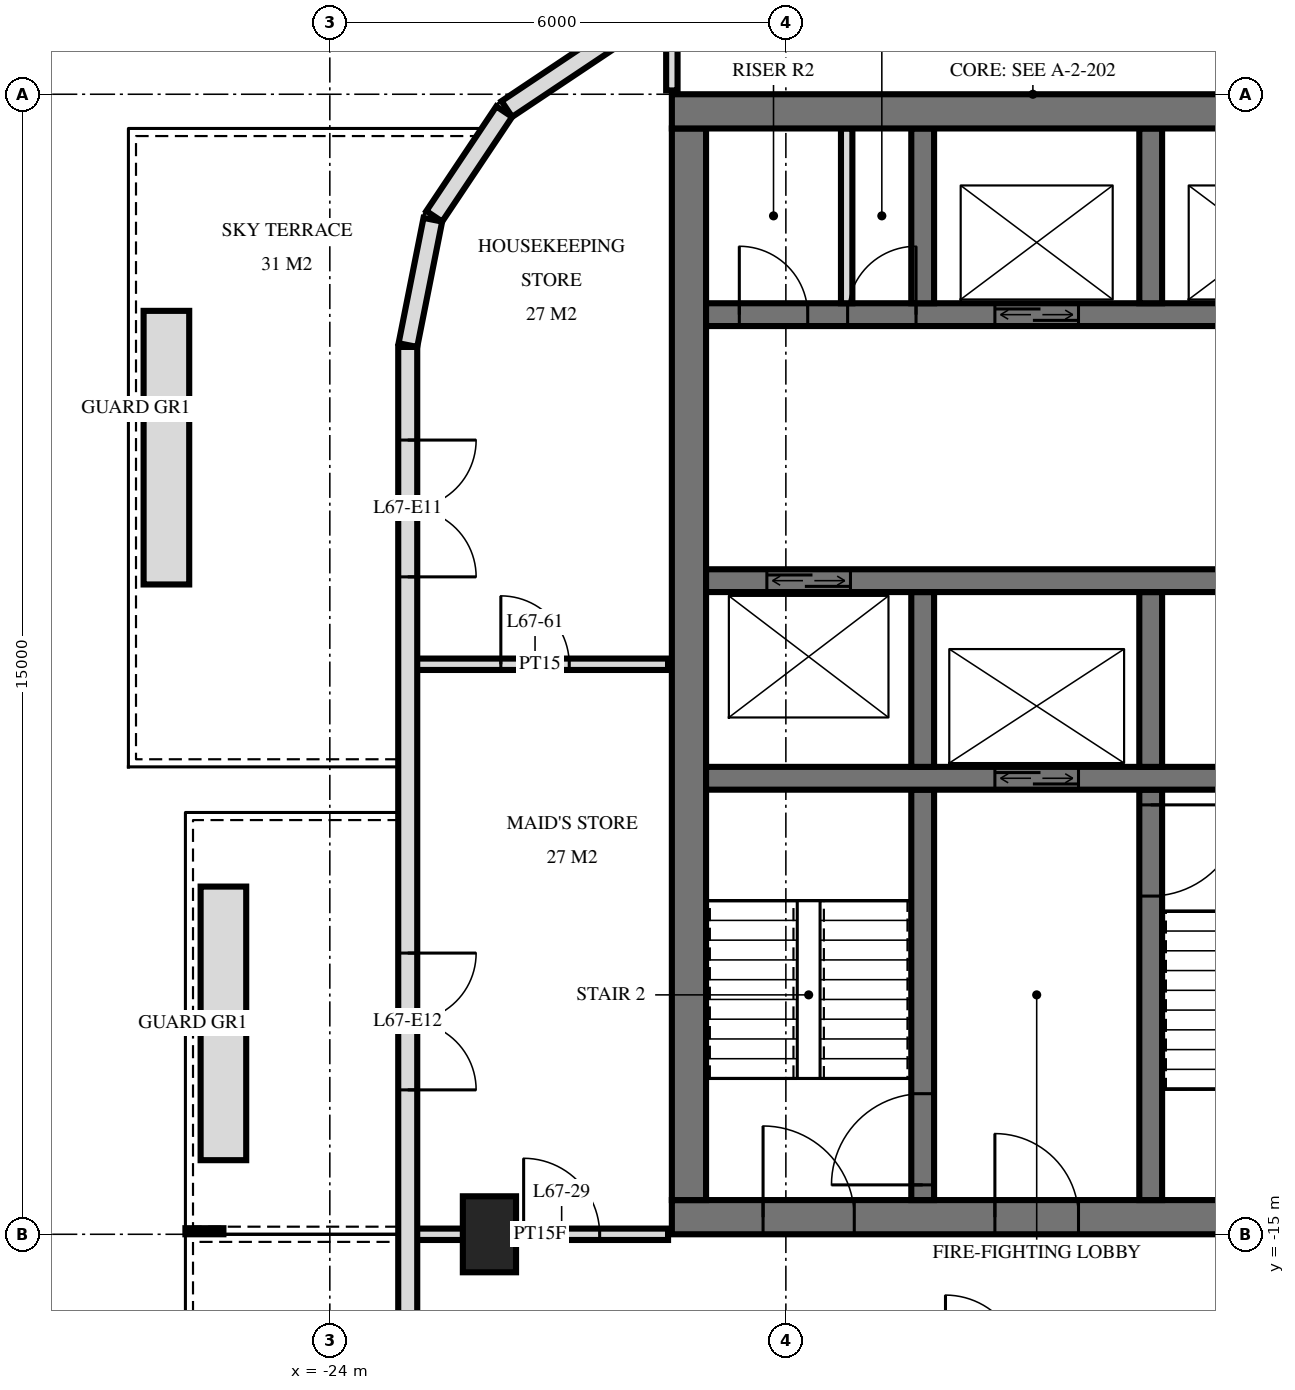
"""IFC4 building model, lengths in metres.
Left out: names, types, materials, properties, quantities, classifications, styles, units other than length and angle.
Written with IfcOpenShell. Run it as: python <this file> out.ifc"""

import sys

from ifc_helpers import new_model, si_unit, direction, frame, frame_2d, origin, origin_2d, place, context, subcontext, project, spatial, rectangle, extrude, element, fill, save


model = new_model("IFC4")
c1 = context("Model", 3, precision=1e-05, world=origin(), true_north=direction((0.0, 1.0)))
c2 = subcontext(c1, "Body", "Model", "MODEL_VIEW")
j1 = project(units=[si_unit("LENGTHUNIT", "METRE"), si_unit("PLANEANGLEUNIT", "RADIAN")], contexts=[c1])
p1 = place(None, origin())
s1 = spatial("IfcSite", under=j1, at=p1, CompositionType="ELEMENT")
p2 = place(p1, origin())
s2 = spatial("IfcBuilding", under=s1, at=p2, CompositionType="ELEMENT")
p3 = place(p2, frame((0.0, 0.0, 256.1)))
s3 = spatial("IfcBuildingStorey", under=s2, at=p3, CompositionType="ELEMENT", Elevation=256.1)
p4 = place(p3, frame((-21.9, -15.0, 0.0), z_axis=(0.0, 0.0, 1.0), x_axis=(0.0, 1.0, 0.0)))
e1 = element("IfcColumn", 1, at=p4, inside=s3, PredefinedType="COLUMN", context=c2, shape_type="SweptSolid", body=[
    extrude(rectangle(XDim=1.0, YDim=0.7, at=origin_2d()), origin(), (0.0, 0.0, 1.0), 3.5),
])
p5 = place(p3, frame((-19.5, -0.225, 0.0), z_axis=(0.0, 0.0, 1.0), x_axis=(1.0, 0.0, 0.0)))
e2 = element("IfcWall", 2, at=p5, inside=s3, PredefinedType="SHEAR", context=c2, shape_type="SweptSolid", body=[
    extrude(rectangle(XDim=9.5, YDim=0.45, at=frame_2d((4.75, 0.0))), origin(), (0.0, 0.0, 1.0), 3.5),
])
p6 = place(p3, frame((-19.5, -14.775, 0.0), z_axis=(0.0, 0.0, 1.0), x_axis=(1.0, 0.0, 0.0)))
e3 = element("IfcWall", 3, at=p6, inside=s3, PredefinedType="SHEAR", context=c2, shape_type="SweptSolid", body=[
    extrude(rectangle(XDim=9.5, YDim=0.45, at=frame_2d((4.75, 0.0))), origin(), (0.0, 0.0, 1.0), 3.5),
])
p7 = place(p6, frame((1.2, 0.0, 0.0)))
e4 = element("IfcOpeningElement", 4, at=p7, cuts=e3, PredefinedType="OPENING", context=c2, shape_type="SweptSolid", body=[
    extrude(rectangle(XDim=1.2, YDim=2.1, at=frame_2d((0.6, 1.05))), frame((0.0, 0.235, 0.0), z_axis=(0.0, -1.0, 0.0), x_axis=(1.0, 0.0, 0.0)), (0.0, 0.0, 1.0), 0.47),
])
p8 = place(p6, frame((4.25, 0.0, 0.0)))
e5 = element("IfcOpeningElement", 5, at=p8, cuts=e3, PredefinedType="OPENING", context=c2, shape_type="SweptSolid", body=[
    extrude(rectangle(XDim=1.1, YDim=2.1, at=frame_2d((0.55, 1.05))), frame((0.0, 0.235, 0.0), z_axis=(0.0, -1.0, 0.0), x_axis=(1.0, 0.0, 0.0)), (0.0, 0.0, 1.0), 0.47),
])
p9 = place(p3, frame((-19.275, -14.55, 0.0), z_axis=(0.0, 0.0, 1.0), x_axis=(0.0, 1.0, 0.0)))
e6 = element("IfcWall", 6, at=p9, inside=s3, PredefinedType="SHEAR", context=c2, shape_type="SweptSolid", body=[
    extrude(rectangle(XDim=14.1, YDim=0.45, at=frame_2d((7.05, 0.0))), origin(), (0.0, 0.0, 1.0), 3.5),
])
p10 = place(p3, frame((-19.05, -2.9, 0.0), z_axis=(0.0, 0.0, 1.0), x_axis=(1.0, 0.0, 0.0)))
e7 = element("IfcWall", 7, at=p10, inside=s3, PredefinedType="SHEAR", context=c2, shape_type="SweptSolid", body=[
    extrude(rectangle(XDim=8.7, YDim=0.3, at=frame_2d((4.35, 0.0))), origin(), (0.0, 0.0, 1.0), 3.5),
])
p11 = place(p10, frame((6.8, 0.0, 0.0)))
e8 = element("IfcOpeningElement", 8, at=p11, cuts=e7, PredefinedType="OPENING", context=c2, shape_type="SweptSolid", body=[
    extrude(rectangle(XDim=1.1, YDim=2.1, at=frame_2d((0.55, 1.05))), frame((0.0, 0.16, 0.0), z_axis=(0.0, -1.0, 0.0), x_axis=(1.0, 0.0, 0.0)), (0.0, 0.0, 1.0), 0.32),
])
p12 = place(p10, frame((3.8, 0.0, 0.0)))
e9 = element("IfcOpeningElement", 9, at=p12, cuts=e7, PredefinedType="OPENING", context=c2, shape_type="SweptSolid", body=[
    extrude(rectangle(XDim=1.1, YDim=2.1, at=frame_2d((0.55, 1.05))), frame((0.0, 0.16, 0.0), z_axis=(0.0, -1.0, 0.0), x_axis=(1.0, 0.0, 0.0)), (0.0, 0.0, 1.0), 0.32),
])
p13 = place(p10, frame((1.863, 0.0, 0.0)))
e10 = element("IfcOpeningElement", 10, at=p13, cuts=e7, PredefinedType="OPENING", context=c2, shape_type="SweptSolid", body=[
    extrude(rectangle(XDim=0.9, YDim=2.1, at=frame_2d((0.45, 1.05))), frame((0.0, 0.16, 0.0), z_axis=(0.0, -1.0, 0.0), x_axis=(1.0, 0.0, 0.0)), (0.0, 0.0, 1.0), 0.32),
])
p14 = place(p10, frame((0.438, 0.0, 0.0)))
e11 = element("IfcOpeningElement", 11, at=p14, cuts=e7, PredefinedType="OPENING", context=c2, shape_type="SweptSolid", body=[
    extrude(rectangle(XDim=0.9, YDim=2.1, at=frame_2d((0.45, 1.05))), frame((0.0, 0.16, 0.0), z_axis=(0.0, -1.0, 0.0), x_axis=(1.0, 0.0, 0.0)), (0.0, 0.0, 1.0), 0.32),
])
p15 = place(p3, frame((-19.05, -6.4, 0.0), z_axis=(0.0, 0.0, 1.0), x_axis=(1.0, 0.0, 0.0)))
e12 = element("IfcWall", 12, at=p15, inside=s3, PredefinedType="SHEAR", context=c2, shape_type="SweptSolid", body=[
    extrude(rectangle(XDim=8.7, YDim=0.3, at=frame_2d((4.35, 0.0))), origin(), (0.0, 0.0, 1.0), 3.5),
])
p16 = place(p15, frame((0.8, 0.0, 0.0)))
e13 = element("IfcOpeningElement", 13, at=p16, cuts=e12, PredefinedType="OPENING", context=c2, shape_type="SweptSolid", body=[
    extrude(rectangle(XDim=1.1, YDim=2.1, at=frame_2d((0.55, 1.05))), frame((0.0, 0.16, 0.0), z_axis=(0.0, -1.0, 0.0), x_axis=(1.0, 0.0, 0.0)), (0.0, 0.0, 1.0), 0.32),
])
p17 = place(p3, frame((-19.05, -9.0, 0.0), z_axis=(0.0, 0.0, 1.0), x_axis=(1.0, 0.0, 0.0)))
e14 = element("IfcWall", 14, at=p17, inside=s3, PredefinedType="SHEAR", context=c2, shape_type="SweptSolid", body=[
    extrude(rectangle(XDim=8.7, YDim=0.3, at=frame_2d((4.35, 0.0))), origin(), (0.0, 0.0, 1.0), 3.5),
])
p18 = place(p17, frame((3.8, 0.0, 0.0)))
e15 = element("IfcOpeningElement", 15, at=p18, cuts=e14, PredefinedType="OPENING", context=c2, shape_type="SweptSolid", body=[
    extrude(rectangle(XDim=1.1, YDim=2.1, at=frame_2d((0.55, 1.05))), frame((0.0, 0.16, 0.0), z_axis=(0.0, -1.0, 0.0), x_axis=(1.0, 0.0, 0.0)), (0.0, 0.0, 1.0), 0.32),
])
for number, where, z_axis, x_axis in (
    (16, (-13.2, -2.75, 0.0), (0.0, 0.0, 1.0), (0.0, 1.0, 0.0)),
    (17, (-13.2, -8.85, 0.0), (0.0, 0.0, 1.0), (0.0, 1.0, 0.0)),
):
    element("IfcWall", number, at=place(p3, frame(where, z_axis=z_axis, x_axis=x_axis)), inside=s3, PredefinedType="SHEAR", context=c2, shape_type="SweptSolid", body=[
        extrude(rectangle(XDim=2.3, YDim=0.3, at=frame_2d((1.15, 0.0))), origin(), (0.0, 0.0, 1.0), 3.5),
    ])
p19 = place(p3, frame((-13.2, -14.55, 0.0), z_axis=(0.0, 0.0, 1.0), x_axis=(0.0, 1.0, 0.0)))
e18 = element("IfcWall", 18, at=p19, inside=s3, PredefinedType="SHEAR", context=c2, shape_type="SweptSolid", body=[
    extrude(rectangle(XDim=5.4, YDim=0.3, at=frame_2d((2.7, 0.0))), origin(), (0.0, 0.0, 1.0), 3.5),
])
p20 = place(p19, frame((4.0, 0.0, 0.0)))
e19 = element("IfcOpeningElement", 19, at=p20, cuts=e18, PredefinedType="OPENING", context=c2, shape_type="SweptSolid", body=[
    extrude(rectangle(XDim=1.2, YDim=2.1, at=frame_2d((0.6, 1.05))), frame((0.0, 0.16, 0.0), z_axis=(0.0, -1.0, 0.0), x_axis=(1.0, 0.0, 0.0)), (0.0, 0.0, 1.0), 0.32),
])
for number, where, z_axis, x_axis in (
    (20, (-16.2, -2.75, 0.0), (0.0, 0.0, 1.0), (0.0, 1.0, 0.0)),
    (21, (-16.2, -8.85, 0.0), (0.0, 0.0, 1.0), (0.0, 1.0, 0.0)),
):
    element("IfcWall", number, at=place(p3, frame(where, z_axis=z_axis, x_axis=x_axis)), inside=s3, PredefinedType="SHEAR", context=c2, shape_type="SweptSolid", body=[
        extrude(rectangle(XDim=2.3, YDim=0.3, at=frame_2d((1.15, 0.0))), origin(), (0.0, 0.0, 1.0), 3.5),
    ])
p21 = place(p3, frame((-16.2, -14.55, 0.0), z_axis=(0.0, 0.0, 1.0), x_axis=(0.0, 1.0, 0.0)))
e22 = element("IfcWall", 22, at=p21, inside=s3, PredefinedType="SHEAR", context=c2, shape_type="SweptSolid", body=[
    extrude(rectangle(XDim=5.4, YDim=0.3, at=frame_2d((2.7, 0.0))), origin(), (0.0, 0.0, 1.0), 3.5),
])
p22 = place(p21, frame((0.2, 0.0, 0.0)))
e23 = element("IfcOpeningElement", 23, at=p22, cuts=e22, PredefinedType="OPENING", context=c2, shape_type="SweptSolid", body=[
    extrude(rectangle(XDim=1.2, YDim=2.1, at=frame_2d((0.6, 1.05))), frame((0.0, 0.16, 0.0), z_axis=(0.0, -1.0, 0.0), x_axis=(1.0, 0.0, 0.0)), (0.0, 0.0, 1.0), 0.32),
])
for number, where, z_axis, x_axis in (
    (24, (-20.294, 0.726, 0.0), (0.0, 0.0, 1.0), (-0.831, -0.556, 0.0)),
    (25, (-21.706, -0.229, 0.0), (0.0, 0.0, 1.0), (-0.556, -0.831, 0.0)),
):
    element("IfcWall", number, at=place(p3, frame(where, z_axis=z_axis, x_axis=x_axis)), inside=s3, PredefinedType="SOLIDWALL", context=c2, shape_type="SweptSolid", body=[
        extrude(rectangle(XDim=1.656, YDim=0.25, at=frame_2d((0.828, 0.0))), origin(), (0.0, 0.0, 1.0), 3.22),
    ])
p23 = place(p3, frame((-22.645, -1.651, 0.0), z_axis=(0.0, 0.0, 1.0), x_axis=(-0.19513878023, -0.980775640221, 0.0)))
e26 = element("IfcWall", 26, at=p23, inside=s3, PredefinedType="SOLIDWALL", context=c2, shape_type="SweptSolid", body=[
    extrude(rectangle(XDim=1.681, YDim=0.25, at=frame_2d((0.841, 0.0))), origin(), (0.0, 0.0, 1.0), 3.22),
])
p24 = place(p3, frame((-22.975, -3.325, 0.0), z_axis=(0.0, 0.0, 1.0), x_axis=(0.0, -1.0, 0.0)))
e27 = element("IfcWall", 27, at=p24, inside=s3, PredefinedType="SOLIDWALL", context=c2, shape_type="SweptSolid", body=[
    extrude(rectangle(XDim=25.951, YDim=0.25, at=frame_2d((12.975, 0.0))), origin(), (0.0, 0.0, 1.0), 3.22),
])
p25 = place(p24, frame((1.225, 0.0, 0.0)))
e28 = element("IfcOpeningElement", 28, at=p25, cuts=e27, PredefinedType="OPENING", context=c2, shape_type="SweptSolid", body=[
    extrude(rectangle(XDim=1.8, YDim=2.4, at=frame_2d((0.9, 1.2))), frame((0.0, 0.135, 0.0), z_axis=(0.0, -1.0, 0.0), x_axis=(1.0, 0.0, 0.0)), (0.0, 0.0, 1.0), 0.27),
])
p26 = place(p24, frame((7.975, 0.0, 0.0)))
e29 = element("IfcOpeningElement", 29, at=p26, cuts=e27, PredefinedType="OPENING", context=c2, shape_type="SweptSolid", body=[
    extrude(rectangle(XDim=1.8, YDim=2.4, at=frame_2d((0.9, 1.2))), frame((0.0, 0.135, 0.0), z_axis=(0.0, -1.0, 0.0), x_axis=(1.0, 0.0, 0.0)), (0.0, 0.0, 1.0), 0.27),
])
p27 = place(p24, frame((18.175, 0.0, 0.0)))
e30 = element("IfcOpeningElement", 30, at=p27, cuts=e27, PredefinedType="OPENING", context=c2, shape_type="SweptSolid", body=[
    extrude(rectangle(XDim=1.8, YDim=2.4, at=frame_2d((0.9, 1.2))), frame((0.0, 0.135, 0.0), z_axis=(0.0, -1.0, 0.0), x_axis=(1.0, 0.0, 0.0)), (0.0, 0.0, 1.0), 0.27),
])
p28 = place(p24, frame((21.075, 0.0, 0.0)))
e31 = element("IfcOpeningElement", 31, at=p28, cuts=e27, PredefinedType="OPENING", context=c2, shape_type="SweptSolid", body=[
    extrude(rectangle(XDim=1.8, YDim=2.4, at=frame_2d((0.9, 1.2))), frame((0.0, 0.135, 0.0), z_axis=(0.0, -1.0, 0.0), x_axis=(1.0, 0.0, 0.0)), (0.0, 0.0, 1.0), 0.27),
])
p29 = place(p24, frame((23.825, 0.0, 0.9)))
e32 = element("IfcOpeningElement", 32, at=p29, cuts=e27, PredefinedType="OPENING", context=c2, shape_type="SweptSolid", body=[
    extrude(rectangle(XDim=1.8, YDim=1.5, at=frame_2d((0.9, 0.75))), frame((0.0, 0.135, 0.0), z_axis=(0.0, -1.0, 0.0), x_axis=(1.0, 0.0, 0.0)), (0.0, 0.0, 1.0), 0.27),
])
for number, where, z_axis, x_axis in (
    (33, (-25.4, -14.025, 0.0), (0.0, 0.0, 1.0), (0.0, 1.0, 0.0)),
    (34, (-26.15, -6.45, 0.0), (0.0, 0.0, 1.0), (0.0, 1.0, 0.0)),
):
    element("IfcWall", number, at=place(p3, frame(where, z_axis=z_axis, x_axis=x_axis)), inside=s3, PredefinedType="USERDEFINED", context=c2, shape_type="SweptSolid", body=[
        extrude(rectangle(XDim=3.6, YDim=0.6, at=frame_2d((1.8, 0.0))), origin(), (0.0, 0.0, 1.0), 0.65),
    ])
p30 = place(p3, frame((-17.2, -2.75, 0.0), z_axis=(0.0, 0.0, 1.0), x_axis=(0.0, 1.0, 0.0)))
e35 = element("IfcWall", 35, at=p30, inside=s3, PredefinedType="PARTITIONING", context=c2, shape_type="SweptSolid", body=[
    extrude(rectangle(XDim=2.3, YDim=0.15, at=frame_2d((1.15, 0.0))), origin(), (0.0, 0.0, 1.0), 3.2),
])
p31 = place(p3, frame((-19.5, 0.05, 0.0), z_axis=(0.0, 0.0, 1.0), x_axis=(0.0, 1.0, 0.0)))
e36 = element("IfcWall", 36, at=p31, inside=s3, PredefinedType="PARTITIONING", context=c2, shape_type="SweptSolid", body=[
    extrude(rectangle(XDim=0.787, YDim=0.15, at=frame_2d((0.394, 0.0))), origin(), (0.0, 0.0, 1.0), 3.22),
])
p32 = place(p3, frame((-22.92, -15.0, 0.0), z_axis=(0.0, 0.0, 1.0), x_axis=(1.0, 0.0, 0.0)))
e37 = element("IfcWall", 37, at=p32, inside=s3, PredefinedType="PARTITIONING", context=c2, shape_type="SweptSolid", body=[
    extrude(rectangle(XDim=3.37, YDim=0.15, at=frame_2d((1.685, 0.0))), origin(), (0.0, 0.0, 1.0), 3.22),
])
p33 = place(p32, frame((1.47, 0.0, 0.0)))
e38 = element("IfcOpeningElement", 38, at=p33, cuts=e37, PredefinedType="OPENING", context=c2, shape_type="SweptSolid", body=[
    extrude(rectangle(XDim=1.0, YDim=2.1, at=frame_2d((0.5, 1.05))), frame((0.0, 0.085, 0.0), z_axis=(0.0, -1.0, 0.0), x_axis=(1.0, 0.0, 0.0)), (0.0, 0.0, 1.0), 0.17),
])
p34 = place(p3, frame((-22.92, -7.5, 0.0), z_axis=(0.0, 0.0, 1.0), x_axis=(1.0, 0.0, 0.0)))
e39 = element("IfcWall", 39, at=p34, inside=s3, PredefinedType="PARTITIONING", context=c2, shape_type="SweptSolid", body=[
    extrude(rectangle(XDim=3.37, YDim=0.15, at=frame_2d((1.685, 0.0))), origin(), (0.0, 0.0, 1.0), 3.22),
])
p35 = place(p34, frame((1.17, 0.0, 0.0)))
e40 = element("IfcOpeningElement", 40, at=p35, cuts=e39, PredefinedType="OPENING", context=c2, shape_type="SweptSolid", body=[
    extrude(rectangle(XDim=0.9, YDim=2.1, at=frame_2d((0.45, 1.05))), frame((0.0, 0.085, 0.0), z_axis=(0.0, -1.0, 0.0), x_axis=(1.0, 0.0, 0.0)), (0.0, 0.0, 1.0), 0.17),
])
p36 = place(p25, origin())
e41 = element("IfcDoor", 41, at=p36, inside=s3, OperationType="DOUBLE_DOOR_SINGLE_SWING", PredefinedType="DOOR", context=c2, shape_type="SweptSolid", body=[
    extrude(rectangle(XDim=1.8, YDim=2.4, at=frame_2d((0.9, 1.2))), frame((0.0, 0.025, 0.0), z_axis=(0.0, -1.0, 0.0), x_axis=(1.0, 0.0, 0.0)), (0.0, 0.0, 1.0), 0.05),
])
fill(e28, e41)
p37 = place(p26, origin())
e42 = element("IfcDoor", 42, at=p37, inside=s3, OperationType="DOUBLE_DOOR_SINGLE_SWING", PredefinedType="DOOR", context=c2, shape_type="SweptSolid", body=[
    extrude(rectangle(XDim=1.8, YDim=2.4, at=frame_2d((0.9, 1.2))), frame((0.0, 0.025, 0.0), z_axis=(0.0, -1.0, 0.0), x_axis=(1.0, 0.0, 0.0)), (0.0, 0.0, 1.0), 0.05),
])
fill(e29, e42)
p38 = place(p12, origin())
e43 = element("IfcDoor", 43, at=p38, inside=s3, OperationType="DOUBLE_DOOR_SLIDING", PredefinedType="USERDEFINED", context=c2, shape_type="SweptSolid", body=[
    extrude(rectangle(XDim=1.1, YDim=2.1, at=frame_2d((0.55, 1.05))), frame((0.0, 0.025, 0.0), z_axis=(0.0, -1.0, 0.0), x_axis=(1.0, 0.0, 0.0)), (0.0, 0.0, 1.0), 0.05),
])
fill(e9, e43)
p39 = place(p18, origin())
e44 = element("IfcDoor", 44, at=p39, inside=s3, OperationType="DOUBLE_DOOR_SLIDING", PredefinedType="USERDEFINED", context=c2, shape_type="SweptSolid", body=[
    extrude(rectangle(XDim=1.1, YDim=2.1, at=frame_2d((0.55, 1.05))), frame((0.0, 0.025, 0.0), z_axis=(0.0, -1.0, 0.0), x_axis=(1.0, 0.0, 0.0)), (0.0, 0.0, 1.0), 0.05),
])
fill(e15, e44)
p40 = place(p16, origin())
e45 = element("IfcDoor", 45, at=p40, inside=s3, OperationType="DOUBLE_DOOR_SLIDING", PredefinedType="USERDEFINED", context=c2, shape_type="SweptSolid", body=[
    extrude(rectangle(XDim=1.1, YDim=2.1, at=frame_2d((0.55, 1.05))), frame((0.0, 0.025, 0.0), z_axis=(0.0, -1.0, 0.0), x_axis=(1.0, 0.0, 0.0)), (0.0, 0.0, 1.0), 0.05),
])
fill(e13, e45)
p41 = place(p7, origin())
e46 = element("IfcDoor", 46, at=p41, inside=s3, OperationType="SINGLE_SWING_RIGHT", PredefinedType="DOOR", context=c2, shape_type="SweptSolid", body=[
    extrude(rectangle(XDim=1.2, YDim=2.1, at=frame_2d((0.6, 1.05))), frame((0.0, 0.025, 0.0), z_axis=(0.0, -1.0, 0.0), x_axis=(1.0, 0.0, 0.0)), (0.0, 0.0, 1.0), 0.05),
])
fill(e4, e46)
p42 = place(p8, origin())
e47 = element("IfcDoor", 47, at=p42, inside=s3, OperationType="SINGLE_SWING_RIGHT", PredefinedType="DOOR", context=c2, shape_type="SweptSolid", body=[
    extrude(rectangle(XDim=1.1, YDim=2.1, at=frame_2d((0.55, 1.05))), frame((0.0, 0.025, 0.0), z_axis=(0.0, -1.0, 0.0), x_axis=(1.0, 0.0, 0.0)), (0.0, 0.0, 1.0), 0.05),
])
fill(e5, e47)
p43 = place(p13, origin())
e48 = element("IfcDoor", 48, at=p43, inside=s3, OperationType="SINGLE_SWING_LEFT", PredefinedType="DOOR", context=c2, shape_type="SweptSolid", body=[
    extrude(rectangle(XDim=0.9, YDim=2.1, at=frame_2d((0.45, 1.05))), frame((0.0, 0.025, 0.0), z_axis=(0.0, -1.0, 0.0), x_axis=(1.0, 0.0, 0.0)), (0.0, 0.0, 1.0), 0.05),
])
fill(e10, e48)
p44 = place(p14, origin())
e49 = element("IfcDoor", 49, at=p44, inside=s3, OperationType="SINGLE_SWING_RIGHT", PredefinedType="DOOR", context=c2, shape_type="SweptSolid", body=[
    extrude(rectangle(XDim=0.9, YDim=2.1, at=frame_2d((0.45, 1.05))), frame((0.0, 0.025, 0.0), z_axis=(0.0, -1.0, 0.0), x_axis=(1.0, 0.0, 0.0)), (0.0, 0.0, 1.0), 0.05),
])
fill(e11, e49)
p45 = place(p20, frame((0.6, 0.0, 0.0), z_axis=(0.0, 0.0, 1.0), x_axis=(-1.0, 0.0, 0.0)))
e50 = element("IfcDoor", 50, at=p45, inside=s3, OperationType="SINGLE_SWING_RIGHT", PredefinedType="DOOR", context=c2, shape_type="SweptSolid", body=[
    extrude(rectangle(XDim=1.2, YDim=2.1, at=frame_2d((0.0, 1.05))), frame((0.0, -0.025, 0.0), z_axis=(0.0, 1.0, 0.0), x_axis=(-1.0, 0.0, 0.0)), (0.0, 0.0, 1.0), 0.05),
])
fill(e19, e50)
p46 = place(p22, origin())
e51 = element("IfcDoor", 51, at=p46, inside=s3, OperationType="SINGLE_SWING_RIGHT", PredefinedType="DOOR", context=c2, shape_type="SweptSolid", body=[
    extrude(rectangle(XDim=1.2, YDim=2.1, at=frame_2d((0.6, 1.05))), frame((0.0, 0.025, 0.0), z_axis=(0.0, -1.0, 0.0), x_axis=(1.0, 0.0, 0.0)), (0.0, 0.0, 1.0), 0.05),
])
fill(e23, e51)
p47 = place(p33, origin())
e52 = element("IfcDoor", 52, at=p47, inside=s3, OperationType="SINGLE_SWING_RIGHT", PredefinedType="DOOR", context=c2, shape_type="SweptSolid", body=[
    extrude(rectangle(XDim=1.0, YDim=2.1, at=frame_2d((0.5, 1.05))), frame((0.0, 0.025, 0.0), z_axis=(0.0, -1.0, 0.0), x_axis=(1.0, 0.0, 0.0)), (0.0, 0.0, 1.0), 0.05),
])
fill(e38, e52)
p48 = place(p35, origin())
e53 = element("IfcDoor", 53, at=p48, inside=s3, OperationType="SINGLE_SWING_RIGHT", PredefinedType="DOOR", context=c2, shape_type="SweptSolid", body=[
    extrude(rectangle(XDim=0.9, YDim=2.1, at=frame_2d((0.45, 1.05))), frame((0.0, 0.025, 0.0), z_axis=(0.0, -1.0, 0.0), x_axis=(1.0, 0.0, 0.0)), (0.0, 0.0, 1.0), 0.05),
])
fill(e40, e53)
save(model, sys.argv[1])
